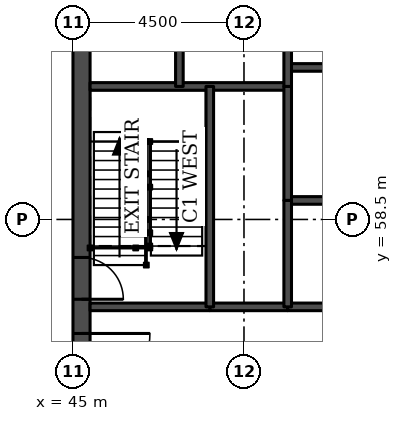
"""IFC4 building model, lengths in metres.
Left out: names, types, materials, properties, quantities, classifications, styles, units other than length and angle.
Written with IfcOpenShell. Run it as: python <this file> out.ifc"""

import sys

from ifc_helpers import new_model, si_unit, direction, frame, frame_2d, origin, place, context, subcontext, project, spatial, rectangle, extrude, element, fill, save


model = new_model("IFC4")
c1 = context("Model", 3, precision=1e-05, world=origin(), true_north=direction((0.0, 1.0)))
c2 = subcontext(c1, "Body", "Model", "MODEL_VIEW")
j1 = project(units=[si_unit("LENGTHUNIT", "METRE"), si_unit("PLANEANGLEUNIT", "RADIAN")], contexts=[c1])
p1 = place(None, origin())
s1 = spatial("IfcSite", under=j1, at=p1, CompositionType="ELEMENT")
p2 = place(p1, origin())
s2 = spatial("IfcBuilding", under=s1, at=p2, CompositionType="ELEMENT")
p3 = place(p2, frame((0.0, 0.0, 119.6)))
s3 = spatial("IfcBuildingStorey", under=s2, at=p3, CompositionType="ELEMENT", Elevation=119.6)
p4 = place(p3, frame((45.225, 49.5, 0.0), z_axis=(0.0, 0.0, 1.0), x_axis=(0.0, 1.0, 0.0)))
e1 = element("IfcWall", 1, at=p4, inside=s3, PredefinedType="SHEAR", context=c2, shape_type="SweptSolid", body=[
    extrude(rectangle(XDim=22.5, YDim=0.45, at=frame_2d((11.25, 0.0))), origin(), (0.0, 0.0, 1.0), 3.7),
])
p5 = place(p4, frame((4.2, 0.0, 0.0)))
e2 = element("IfcOpeningElement", 2, at=p5, cuts=e1, PredefinedType="OPENING", context=c2, shape_type="SweptSolid", body=[
    extrude(rectangle(XDim=1.8, YDim=2.1, at=frame_2d((0.9, 1.05))), frame((0.0, 0.235, 0.0), z_axis=(0.0, -1.0, 0.0), x_axis=(1.0, 0.0, 0.0)), (0.0, 0.0, 1.0), 0.47),
])
p6 = place(p4, frame((6.9, 0.0, 0.0)))
e3 = element("IfcOpeningElement", 3, at=p6, cuts=e1, PredefinedType="OPENING", context=c2, shape_type="SweptSolid", body=[
    extrude(rectangle(XDim=1.1, YDim=2.1, at=frame_2d((0.55, 1.05))), frame((0.0, 0.235, 0.0), z_axis=(0.0, -1.0, 0.0), x_axis=(1.0, 0.0, 0.0)), (0.0, 0.0, 1.0), 0.47),
])
p7 = place(p4, frame((13.6, 0.0, 0.0)))
e4 = element("IfcOpeningElement", 4, at=p7, cuts=e1, PredefinedType="OPENING", context=c2, shape_type="SweptSolid", body=[
    extrude(rectangle(XDim=1.1, YDim=2.1, at=frame_2d((0.55, 1.05))), frame((0.0, 0.235, 0.0), z_axis=(0.0, -1.0, 0.0), x_axis=(1.0, 0.0, 0.0)), (0.0, 0.0, 1.0), 0.47),
])
p8 = place(p4, frame((16.5, 0.0, 0.0)))
e5 = element("IfcOpeningElement", 5, at=p8, cuts=e1, PredefinedType="OPENING", context=c2, shape_type="SweptSolid", body=[
    extrude(rectangle(XDim=1.8, YDim=2.1, at=frame_2d((0.9, 1.05))), frame((0.0, 0.235, 0.0), z_axis=(0.0, -1.0, 0.0), x_axis=(1.0, 0.0, 0.0)), (0.0, 0.0, 1.0), 0.47),
])
p9 = place(p3, frame((48.6, 56.2, 0.0), z_axis=(0.0, 0.0, 1.0), x_axis=(1.0, 0.0, 0.0)))
e6 = element("IfcWall", 6, at=p9, inside=s3, PredefinedType="SOLIDWALL", context=c2, shape_type="SweptSolid", body=[
    extrude(rectangle(XDim=2.05, YDim=0.2, at=frame_2d((1.025, 0.0))), origin(), (0.0, 0.0, 1.0), 3.55),
])
p10 = place(p3, frame((45.45, 56.2, 0.0), z_axis=(0.0, 0.0, 1.0), x_axis=(1.0, 0.0, 0.0)))
e7 = element("IfcWall", 7, at=p10, inside=s3, PredefinedType="SOLIDWALL", context=c2, shape_type="SweptSolid", body=[
    extrude(rectangle(XDim=3.15, YDim=0.2, at=frame_2d((1.575, 0.0))), origin(), (0.0, 0.0, 1.0), 3.55),
])
p11 = place(p3, frame((50.65, 56.2, 0.0), z_axis=(0.0, 0.0, 1.0), x_axis=(1.0, 0.0, 0.0)))
e8 = element("IfcWall", 8, at=p11, inside=s3, PredefinedType="SOLIDWALL", context=c2, shape_type="SweptSolid", body=[
    extrude(rectangle(XDim=11.2, YDim=0.2, at=frame_2d((5.6, 0.0))), origin(), (0.0, 0.0, 1.0), 3.55),
])
p12 = place(p3, frame((50.65, 59.0, 0.0), z_axis=(0.0, 0.0, 1.0), x_axis=(1.0, 0.0, 0.0)))
e9 = element("IfcWall", 9, at=p12, inside=s3, PredefinedType="SOLIDWALL", context=c2, shape_type="SweptSolid", body=[
    extrude(rectangle(XDim=11.2, YDim=0.2, at=frame_2d((5.6, 0.0))), origin(), (0.0, 0.0, 1.0), 3.7),
])
p13 = place(p3, frame((45.45, 62.0, 0.0), z_axis=(0.0, 0.0, 1.0), x_axis=(1.0, 0.0, 0.0)))
e10 = element("IfcWall", 10, at=p13, inside=s3, PredefinedType="SOLIDWALL", context=c2, shape_type="SweptSolid", body=[
    extrude(rectangle(XDim=5.2, YDim=0.2, at=frame_2d((2.6, 0.0))), origin(), (0.0, 0.0, 1.0), 3.55),
])
p14 = place(p3, frame((50.65, 62.5, 0.0), z_axis=(0.0, 0.0, 1.0), x_axis=(1.0, 0.0, 0.0)))
e11 = element("IfcWall", 11, at=p14, inside=s3, PredefinedType="SOLIDWALL", context=c2, shape_type="SweptSolid", body=[
    extrude(rectangle(XDim=11.2, YDim=0.2, at=frame_2d((5.6, 0.0))), origin(), (0.0, 0.0, 1.0), 3.7),
])
p15 = place(p3, frame((47.8, 62.0, 0.0), z_axis=(0.0, 0.0, 1.0), x_axis=(0.0, 1.0, 0.0)))
e12 = element("IfcWall", 12, at=p15, inside=s3, PredefinedType="SOLIDWALL", context=c2, shape_type="SweptSolid", body=[
    extrude(rectangle(XDim=3.3, YDim=0.2, at=frame_2d((1.65, 0.0))), origin(), (0.0, 0.0, 1.0), 3.55),
])
p16 = place(p15, frame((1.1, 0.0, 0.0)))
e13 = element("IfcOpeningElement", 13, at=p16, cuts=e12, PredefinedType="OPENING", context=c2, shape_type="SweptSolid", body=[
    extrude(rectangle(XDim=1.1, YDim=2.1, at=frame_2d((0.55, 1.05))), frame((0.0, 0.11, 0.0), z_axis=(0.0, -1.0, 0.0), x_axis=(1.0, 0.0, 0.0)), (0.0, 0.0, 1.0), 0.22),
])
p17 = place(p3, frame((48.6, 56.2, 0.0), z_axis=(0.0, 0.0, 1.0), x_axis=(0.0, 1.0, 0.0)))
e14 = element("IfcWall", 14, at=p17, inside=s3, PredefinedType="SOLIDWALL", context=c2, shape_type="SweptSolid", body=[
    extrude(rectangle(XDim=5.8, YDim=0.2, at=frame_2d((2.9, 0.0))), origin(), (0.0, 0.0, 1.0), 3.55),
])
p18 = place(p3, frame((50.65, 59.0, 0.0), z_axis=(0.0, 0.0, 1.0), x_axis=(0.0, 1.0, 0.0)))
e15 = element("IfcWall", 15, at=p18, inside=s3, PredefinedType="SOLIDWALL", context=c2, shape_type="SweptSolid", body=[
    extrude(rectangle(XDim=3.0, YDim=0.2, at=frame_2d((1.5, 0.0))), origin(), (0.0, 0.0, 1.0), 3.7),
])
p19 = place(p3, frame((50.65, 56.2, 0.0), z_axis=(0.0, 0.0, 1.0), x_axis=(0.0, 1.0, 0.0)))
e16 = element("IfcWall", 16, at=p19, inside=s3, PredefinedType="SOLIDWALL", context=c2, shape_type="SweptSolid", body=[
    extrude(rectangle(XDim=2.8, YDim=0.2, at=frame_2d((1.4, 0.0))), origin(), (0.0, 0.0, 1.0), 3.55),
])
p20 = place(p3, frame((50.65, 62.0, 0.0), z_axis=(0.0, 0.0, 1.0), x_axis=(0.0, 1.0, 0.0)))
e17 = element("IfcWall", 17, at=p20, inside=s3, PredefinedType="SOLIDWALL", context=c2, shape_type="SweptSolid", body=[
    extrude(rectangle(XDim=3.3, YDim=0.2, at=frame_2d((1.65, 0.0))), origin(), (0.0, 0.0, 1.0), 3.55),
])
p21 = place(p5, frame((1.8, 0.0, 0.0), z_axis=(0.0, 0.0, 1.0), x_axis=(-1.0, 0.0, 0.0)))
e18 = element("IfcDoor", 18, at=p21, inside=s3, OperationType="SINGLE_SWING_LEFT", PredefinedType="DOOR", context=c2, shape_type="SweptSolid", body=[
    extrude(rectangle(XDim=1.8, YDim=2.1, at=frame_2d((0.9, 1.05))), frame((0.0, 0.025, 0.0), z_axis=(0.0, -1.0, 0.0), x_axis=(1.0, 0.0, 0.0)), (0.0, 0.0, 1.0), 0.05),
])
fill(e2, e18)
p22 = place(p6, frame((1.1, 0.0, 0.0), z_axis=(0.0, 0.0, 1.0), x_axis=(-1.0, 0.0, 0.0)))
e19 = element("IfcDoor", 19, at=p22, inside=s3, OperationType="SINGLE_SWING_RIGHT", PredefinedType="DOOR", context=c2, shape_type="SweptSolid", body=[
    extrude(rectangle(XDim=1.1, YDim=2.1, at=frame_2d((0.55, 1.05))), frame((0.0, 0.025, 0.0), z_axis=(0.0, -1.0, 0.0), x_axis=(1.0, 0.0, 0.0)), (0.0, 0.0, 1.0), 0.05),
])
fill(e3, e19)
save(model, sys.argv[1])
